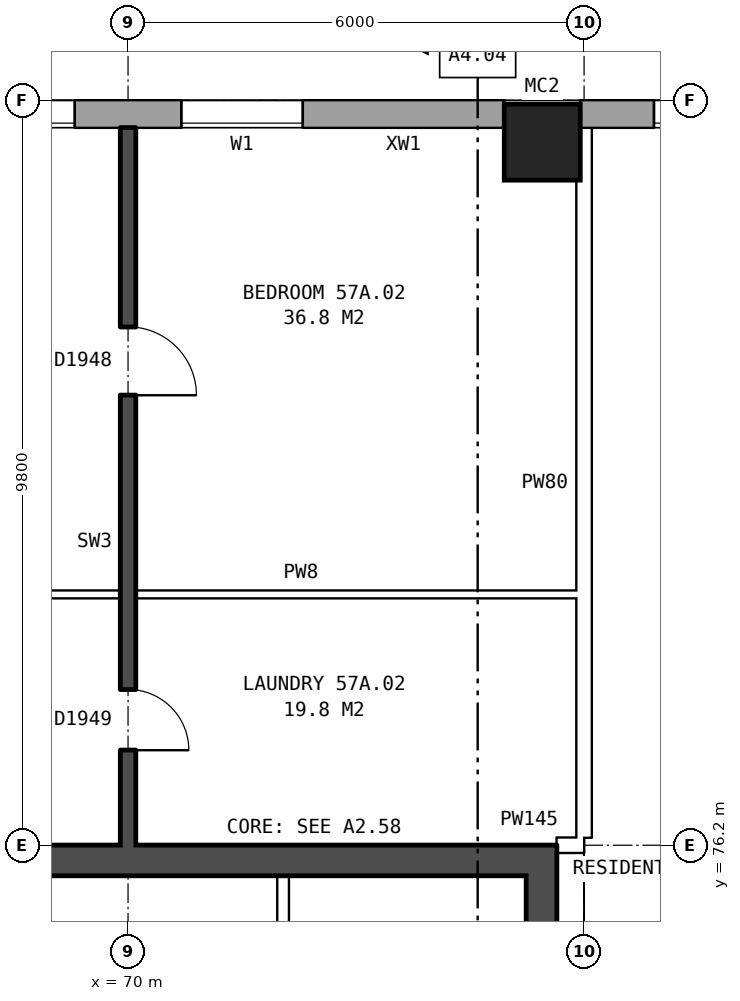
"""IFC4 building model, lengths in metres.
Left out: names, types, materials, properties, quantities, classifications, styles, units other than length and angle.
Written with IfcOpenShell. Run it as: python <this file> out.ifc"""

import sys

from ifc_helpers import new_model, si_unit, direction, frame, frame_2d, origin, origin_2d, place, context, subcontext, project, spatial, rectangle, hollow_rectangle, extrude, element, fill, save


model = new_model("IFC4")
c1 = context("Model", 3, precision=1e-05, world=origin(), true_north=direction((0.0, 1.0)))
c2 = subcontext(c1, "Body", "Model", "MODEL_VIEW")
j1 = project(units=[si_unit("LENGTHUNIT", "METRE"), si_unit("PLANEANGLEUNIT", "RADIAN")], contexts=[c1])
p1 = place(None, origin())
s1 = spatial("IfcSite", under=j1, at=p1, CompositionType="ELEMENT")
p2 = place(p1, origin())
s2 = spatial("IfcBuilding", under=s1, at=p2, CompositionType="ELEMENT")
p3 = place(p2, frame((0.0, 0.0, 202.8)))
s3 = spatial("IfcBuildingStorey", under=s2, at=p3, CompositionType="ELEMENT", Elevation=202.8)
p4 = place(p3, frame((75.45, 85.45, 0.0), z_axis=(0.0, 0.0, 1.0), x_axis=(1.0, 0.0, 0.0)))
e1 = element("IfcColumn", 1, at=p4, inside=s3, PredefinedType="COLUMN", context=c2, shape_type="SweptSolid", body=[
    extrude(hollow_rectangle(XDim=1.0, YDim=1.0, WallThickness=0.055, at=origin_2d()), origin(), (0.0, 0.0, 1.0), 3.1),
])
p5 = place(p3, frame((131.05, 85.82, 0.0), z_axis=(0.0, 0.0, 1.0), x_axis=(-1.0, 0.0, 0.0)))
e2 = element("IfcWall", 2, at=p5, inside=s3, PredefinedType="STANDARD", context=c2, shape_type="SweptSolid", body=[
    extrude(rectangle(XDim=55.1, YDim=0.36, at=frame_2d((27.55, 0.0))), origin(), (0.0, 0.0, 1.0), 2.85),
])
p6 = place(p5, frame((0.969, 0.0, 0.8)))
e3 = element("IfcOpeningElement", 3, at=p6, cuts=e2, PredefinedType="OPENING", context=c2, shape_type="SweptSolid", body=[
    extrude(rectangle(XDim=1.6, YDim=1.8, at=frame_2d((0.8, 0.9))), frame((0.0, 0.19, 0.0), z_axis=(0.0, -1.0, 0.0), x_axis=(1.0, 0.0, 0.0)), (0.0, 0.0, 1.0), 0.38),
])
p7 = place(p5, frame((4.406, 0.0, 0.8)))
e4 = element("IfcOpeningElement", 4, at=p7, cuts=e2, PredefinedType="OPENING", context=c2, shape_type="SweptSolid", body=[
    extrude(rectangle(XDim=1.6, YDim=1.8, at=frame_2d((0.8, 0.9))), frame((0.0, 0.19, 0.0), z_axis=(0.0, -1.0, 0.0), x_axis=(1.0, 0.0, 0.0)), (0.0, 0.0, 1.0), 0.38),
])
p8 = place(p5, frame((7.844, 0.0, 0.8)))
e5 = element("IfcOpeningElement", 5, at=p8, cuts=e2, PredefinedType="OPENING", context=c2, shape_type="SweptSolid", body=[
    extrude(rectangle(XDim=1.6, YDim=1.8, at=frame_2d((0.8, 0.9))), frame((0.0, 0.19, 0.0), z_axis=(0.0, -1.0, 0.0), x_axis=(1.0, 0.0, 0.0)), (0.0, 0.0, 1.0), 0.38),
])
p9 = place(p5, frame((11.281, 0.0, 0.8)))
e6 = element("IfcOpeningElement", 6, at=p9, cuts=e2, PredefinedType="OPENING", context=c2, shape_type="SweptSolid", body=[
    extrude(rectangle(XDim=1.6, YDim=1.8, at=frame_2d((0.8, 0.9))), frame((0.0, 0.19, 0.0), z_axis=(0.0, -1.0, 0.0), x_axis=(1.0, 0.0, 0.0)), (0.0, 0.0, 1.0), 0.38),
])
p10 = place(p5, frame((14.719, 0.0, 0.8)))
e7 = element("IfcOpeningElement", 7, at=p10, cuts=e2, PredefinedType="OPENING", context=c2, shape_type="SweptSolid", body=[
    extrude(rectangle(XDim=1.6, YDim=1.8, at=frame_2d((0.8, 0.9))), frame((0.0, 0.19, 0.0), z_axis=(0.0, -1.0, 0.0), x_axis=(1.0, 0.0, 0.0)), (0.0, 0.0, 1.0), 0.38),
])
p11 = place(p5, frame((18.156, 0.0, 0.8)))
e8 = element("IfcOpeningElement", 8, at=p11, cuts=e2, PredefinedType="OPENING", context=c2, shape_type="SweptSolid", body=[
    extrude(rectangle(XDim=1.6, YDim=1.8, at=frame_2d((0.8, 0.9))), frame((0.0, 0.19, 0.0), z_axis=(0.0, -1.0, 0.0), x_axis=(1.0, 0.0, 0.0)), (0.0, 0.0, 1.0), 0.38),
])
p12 = place(p5, frame((21.594, 0.0, 0.8)))
e9 = element("IfcOpeningElement", 9, at=p12, cuts=e2, PredefinedType="OPENING", context=c2, shape_type="SweptSolid", body=[
    extrude(rectangle(XDim=1.6, YDim=1.8, at=frame_2d((0.8, 0.9))), frame((0.0, 0.19, 0.0), z_axis=(0.0, -1.0, 0.0), x_axis=(1.0, 0.0, 0.0)), (0.0, 0.0, 1.0), 0.38),
])
p13 = place(p5, frame((25.031, 0.0, 0.8)))
e10 = element("IfcOpeningElement", 10, at=p13, cuts=e2, PredefinedType="OPENING", context=c2, shape_type="SweptSolid", body=[
    extrude(rectangle(XDim=1.6, YDim=1.8, at=frame_2d((0.8, 0.9))), frame((0.0, 0.19, 0.0), z_axis=(0.0, -1.0, 0.0), x_axis=(1.0, 0.0, 0.0)), (0.0, 0.0, 1.0), 0.38),
])
p14 = place(p5, frame((28.469, 0.0, 0.8)))
e11 = element("IfcOpeningElement", 11, at=p14, cuts=e2, PredefinedType="OPENING", context=c2, shape_type="SweptSolid", body=[
    extrude(rectangle(XDim=1.6, YDim=1.8, at=frame_2d((0.8, 0.9))), frame((0.0, 0.19, 0.0), z_axis=(0.0, -1.0, 0.0), x_axis=(1.0, 0.0, 0.0)), (0.0, 0.0, 1.0), 0.38),
])
p15 = place(p5, frame((31.906, 0.0, 0.8)))
e12 = element("IfcOpeningElement", 12, at=p15, cuts=e2, PredefinedType="OPENING", context=c2, shape_type="SweptSolid", body=[
    extrude(rectangle(XDim=1.6, YDim=1.8, at=frame_2d((0.8, 0.9))), frame((0.0, 0.19, 0.0), z_axis=(0.0, -1.0, 0.0), x_axis=(1.0, 0.0, 0.0)), (0.0, 0.0, 1.0), 0.38),
])
p16 = place(p5, frame((35.344, 0.0, 0.8)))
e13 = element("IfcOpeningElement", 13, at=p16, cuts=e2, PredefinedType="OPENING", context=c2, shape_type="SweptSolid", body=[
    extrude(rectangle(XDim=1.6, YDim=1.8, at=frame_2d((0.8, 0.9))), frame((0.0, 0.19, 0.0), z_axis=(0.0, -1.0, 0.0), x_axis=(1.0, 0.0, 0.0)), (0.0, 0.0, 1.0), 0.38),
])
p17 = place(p5, frame((38.781, 0.0, 0.8)))
e14 = element("IfcOpeningElement", 14, at=p17, cuts=e2, PredefinedType="OPENING", context=c2, shape_type="SweptSolid", body=[
    extrude(rectangle(XDim=1.6, YDim=1.8, at=frame_2d((0.8, 0.9))), frame((0.0, 0.19, 0.0), z_axis=(0.0, -1.0, 0.0), x_axis=(1.0, 0.0, 0.0)), (0.0, 0.0, 1.0), 0.38),
])
p18 = place(p5, frame((42.219, 0.0, 0.8)))
e15 = element("IfcOpeningElement", 15, at=p18, cuts=e2, PredefinedType="OPENING", context=c2, shape_type="SweptSolid", body=[
    extrude(rectangle(XDim=1.6, YDim=1.8, at=frame_2d((0.8, 0.9))), frame((0.0, 0.19, 0.0), z_axis=(0.0, -1.0, 0.0), x_axis=(1.0, 0.0, 0.0)), (0.0, 0.0, 1.0), 0.38),
])
p19 = place(p5, frame((45.656, 0.0, 0.8)))
e16 = element("IfcOpeningElement", 16, at=p19, cuts=e2, PredefinedType="OPENING", context=c2, shape_type="SweptSolid", body=[
    extrude(rectangle(XDim=1.6, YDim=1.8, at=frame_2d((0.8, 0.9))), frame((0.0, 0.19, 0.0), z_axis=(0.0, -1.0, 0.0), x_axis=(1.0, 0.0, 0.0)), (0.0, 0.0, 1.0), 0.38),
])
p20 = place(p5, frame((49.094, 0.0, 0.8)))
e17 = element("IfcOpeningElement", 17, at=p20, cuts=e2, PredefinedType="OPENING", context=c2, shape_type="SweptSolid", body=[
    extrude(rectangle(XDim=1.6, YDim=1.8, at=frame_2d((0.8, 0.9))), frame((0.0, 0.19, 0.0), z_axis=(0.0, -1.0, 0.0), x_axis=(1.0, 0.0, 0.0)), (0.0, 0.0, 1.0), 0.38),
])
p21 = place(p5, frame((52.531, 0.0, 0.8)))
e18 = element("IfcOpeningElement", 18, at=p21, cuts=e2, PredefinedType="OPENING", context=c2, shape_type="SweptSolid", body=[
    extrude(rectangle(XDim=1.6, YDim=1.8, at=frame_2d((0.8, 0.9))), frame((0.0, 0.19, 0.0), z_axis=(0.0, -1.0, 0.0), x_axis=(1.0, 0.0, 0.0)), (0.0, 0.0, 1.0), 0.38),
])
p22 = place(p3, frame((74.95, 85.82, 0.0), z_axis=(0.0, 0.0, 1.0), x_axis=(-1.0, 0.0, 0.0)))
e19 = element("IfcWall", 19, at=p22, inside=s3, PredefinedType="STANDARD", context=c2, shape_type="SweptSolid", body=[
    extrude(rectangle(XDim=39.875, YDim=0.36, at=frame_2d((19.938, 0.0))), origin(), (0.0, 0.0, 1.0), 2.85),
])
p23 = place(p22, frame((2.65, 0.0, 0.8)))
e20 = element("IfcOpeningElement", 20, at=p23, cuts=e19, PredefinedType="OPENING", context=c2, shape_type="SweptSolid", body=[
    extrude(rectangle(XDim=1.6, YDim=1.8, at=frame_2d((0.8, 0.9))), frame((0.0, 0.19, 0.0), z_axis=(0.0, -1.0, 0.0), x_axis=(1.0, 0.0, 0.0)), (0.0, 0.0, 1.0), 0.38),
])
p24 = place(p22, frame((5.65, 0.0, 0.8)))
e21 = element("IfcOpeningElement", 21, at=p24, cuts=e19, PredefinedType="OPENING", context=c2, shape_type="SweptSolid", body=[
    extrude(rectangle(XDim=1.6, YDim=1.8, at=frame_2d((0.8, 0.9))), frame((0.0, 0.19, 0.0), z_axis=(0.0, -1.0, 0.0), x_axis=(1.0, 0.0, 0.0)), (0.0, 0.0, 1.0), 0.38),
])
p25 = place(p22, frame((8.65, 0.0, 0.8)))
e22 = element("IfcOpeningElement", 22, at=p25, cuts=e19, PredefinedType="OPENING", context=c2, shape_type="SweptSolid", body=[
    extrude(rectangle(XDim=1.6, YDim=1.8, at=frame_2d((0.8, 0.9))), frame((0.0, 0.19, 0.0), z_axis=(0.0, -1.0, 0.0), x_axis=(1.0, 0.0, 0.0)), (0.0, 0.0, 1.0), 0.38),
])
p26 = place(p22, frame((11.65, 0.0, 0.8)))
e23 = element("IfcOpeningElement", 23, at=p26, cuts=e19, PredefinedType="OPENING", context=c2, shape_type="SweptSolid", body=[
    extrude(rectangle(XDim=1.6, YDim=1.8, at=frame_2d((0.8, 0.9))), frame((0.0, 0.19, 0.0), z_axis=(0.0, -1.0, 0.0), x_axis=(1.0, 0.0, 0.0)), (0.0, 0.0, 1.0), 0.38),
])
p27 = place(p22, frame((14.65, 0.0, 0.8)))
e24 = element("IfcOpeningElement", 24, at=p27, cuts=e19, PredefinedType="OPENING", context=c2, shape_type="SweptSolid", body=[
    extrude(rectangle(XDim=1.6, YDim=1.8, at=frame_2d((0.8, 0.9))), frame((0.0, 0.19, 0.0), z_axis=(0.0, -1.0, 0.0), x_axis=(1.0, 0.0, 0.0)), (0.0, 0.0, 1.0), 0.38),
])
p28 = place(p22, frame((17.65, 0.0, 0.8)))
e25 = element("IfcOpeningElement", 25, at=p28, cuts=e19, PredefinedType="OPENING", context=c2, shape_type="SweptSolid", body=[
    extrude(rectangle(XDim=1.6, YDim=1.8, at=frame_2d((0.8, 0.9))), frame((0.0, 0.19, 0.0), z_axis=(0.0, -1.0, 0.0), x_axis=(1.0, 0.0, 0.0)), (0.0, 0.0, 1.0), 0.38),
])
p29 = place(p22, frame((20.65, 0.0, 0.8)))
e26 = element("IfcOpeningElement", 26, at=p29, cuts=e19, PredefinedType="OPENING", context=c2, shape_type="SweptSolid", body=[
    extrude(rectangle(XDim=1.6, YDim=1.8, at=frame_2d((0.8, 0.9))), frame((0.0, 0.19, 0.0), z_axis=(0.0, -1.0, 0.0), x_axis=(1.0, 0.0, 0.0)), (0.0, 0.0, 1.0), 0.38),
])
p30 = place(p22, frame((23.65, 0.0, 0.8)))
e27 = element("IfcOpeningElement", 27, at=p30, cuts=e19, PredefinedType="OPENING", context=c2, shape_type="SweptSolid", body=[
    extrude(rectangle(XDim=1.6, YDim=1.8, at=frame_2d((0.8, 0.9))), frame((0.0, 0.19, 0.0), z_axis=(0.0, -1.0, 0.0), x_axis=(1.0, 0.0, 0.0)), (0.0, 0.0, 1.0), 0.38),
])
p31 = place(p22, frame((26.65, 0.0, 0.8)))
e28 = element("IfcOpeningElement", 28, at=p31, cuts=e19, PredefinedType="OPENING", context=c2, shape_type="SweptSolid", body=[
    extrude(rectangle(XDim=1.6, YDim=1.8, at=frame_2d((0.8, 0.9))), frame((0.0, 0.19, 0.0), z_axis=(0.0, -1.0, 0.0), x_axis=(1.0, 0.0, 0.0)), (0.0, 0.0, 1.0), 0.38),
])
p32 = place(p22, frame((29.65, 0.0, 0.8)))
e29 = element("IfcOpeningElement", 29, at=p32, cuts=e19, PredefinedType="OPENING", context=c2, shape_type="SweptSolid", body=[
    extrude(rectangle(XDim=1.6, YDim=1.8, at=frame_2d((0.8, 0.9))), frame((0.0, 0.19, 0.0), z_axis=(0.0, -1.0, 0.0), x_axis=(1.0, 0.0, 0.0)), (0.0, 0.0, 1.0), 0.38),
])
p33 = place(p22, frame((32.65, 0.0, 0.8)))
e30 = element("IfcOpeningElement", 30, at=p33, cuts=e19, PredefinedType="OPENING", context=c2, shape_type="SweptSolid", body=[
    extrude(rectangle(XDim=1.6, YDim=1.8, at=frame_2d((0.8, 0.9))), frame((0.0, 0.19, 0.0), z_axis=(0.0, -1.0, 0.0), x_axis=(1.0, 0.0, 0.0)), (0.0, 0.0, 1.0), 0.38),
])
p34 = place(p22, frame((35.65, 0.0, 0.8)))
e31 = element("IfcOpeningElement", 31, at=p34, cuts=e19, PredefinedType="OPENING", context=c2, shape_type="SweptSolid", body=[
    extrude(rectangle(XDim=1.6, YDim=1.8, at=frame_2d((0.8, 0.9))), frame((0.0, 0.19, 0.0), z_axis=(0.0, -1.0, 0.0), x_axis=(1.0, 0.0, 0.0)), (0.0, 0.0, 1.0), 0.38),
])
p35 = place(p3, frame((75.44, 63.8, 0.0), z_axis=(0.0, 0.0, 1.0), x_axis=(0.0, 1.0, 0.0)))
e32 = element("IfcWall", 32, at=p35, inside=s3, PredefinedType="SHEAR", context=c2, shape_type="SweptSolid", body=[
    extrude(rectangle(XDim=12.4, YDim=0.4, at=frame_2d((6.2, 0.0))), origin(), (0.0, 0.0, 1.0), 2.85),
])
p36 = place(p35, frame((9.8, 0.0, 0.0)))
e33 = element("IfcOpeningElement", 33, at=p36, cuts=e32, PredefinedType="OPENING", context=c2, shape_type="SweptSolid", body=[
    extrude(rectangle(XDim=1.1, YDim=2.1, at=frame_2d((0.55, 1.05))), frame((0.0, 0.21, 0.0), z_axis=(0.0, -1.0, 0.0), x_axis=(1.0, 0.0, 0.0)), (0.0, 0.0, 1.0), 0.42),
])
p37 = place(p3, frame((67.04, 76.0, 0.0), z_axis=(0.0, 0.0, 1.0), x_axis=(1.0, 0.0, 0.0)))
e34 = element("IfcWall", 34, at=p37, inside=s3, PredefinedType="SHEAR", context=c2, shape_type="SweptSolid", body=[
    extrude(rectangle(XDim=8.2, YDim=0.4, at=frame_2d((4.1, 0.0))), origin(), (0.0, 0.0, 1.0), 2.85),
])
p38 = place(p3, frame((72.04, 73.45, 0.0), z_axis=(0.0, 0.0, 1.0), x_axis=(0.0, 1.0, 0.0)))
e35 = element("IfcWall", 35, at=p38, inside=s3, PredefinedType="PARTITIONING", context=c2, shape_type="SweptSolid", body=[
    extrude(rectangle(XDim=2.35, YDim=0.15, at=frame_2d((1.175, 0.0))), origin(), (0.0, 0.0, 1.0), 2.85),
])
p39 = place(p38, frame((0.75, 0.0, 0.0)))
e36 = element("IfcOpeningElement", 36, at=p39, cuts=e35, PredefinedType="OPENING", context=c2, shape_type="SweptSolid", body=[
    extrude(rectangle(XDim=0.85, YDim=2.1, at=frame_2d((0.425, 1.05))), frame((0.0, 0.085, 0.0), z_axis=(0.0, -1.0, 0.0), x_axis=(1.0, 0.0, 0.0)), (0.0, 0.0, 1.0), 0.17),
])
p40 = place(p3, frame((75.64, 76.2, 0.0), z_axis=(0.0, 0.0, 1.0), x_axis=(1.0, 0.0, 0.0)))
e37 = element("IfcWall", 37, at=p40, inside=s3, PredefinedType="PARTITIONING", context=c2, shape_type="SweptSolid", body=[
    extrude(rectangle(XDim=0.36, YDim=0.2, at=frame_2d((0.18, 0.0))), origin(), (0.0, 0.0, 1.0), 2.85),
])
p41 = place(p3, frame((64.1, 79.5, 0.0), z_axis=(0.0, 0.0, 1.0), x_axis=(1.0, 0.0, 0.0)))
e38 = element("IfcWall", 38, at=p41, inside=s3, PredefinedType="PARTITIONING", context=c2, shape_type="SweptSolid", body=[
    extrude(rectangle(XDim=11.8, YDim=0.1, at=frame_2d((5.9, 0.0))), origin(), (0.0, 0.0, 1.0), 2.85),
])
p42 = place(p41, frame((3.65, 0.0, 0.0)))
e39 = element("IfcOpeningElement", 39, at=p42, cuts=e38, PredefinedType="OPENING", context=c2, shape_type="SweptSolid", body=[
    extrude(rectangle(XDim=0.9, YDim=2.1, at=frame_2d((0.45, 1.05))), frame((0.0, 0.06, 0.0), z_axis=(0.0, -1.0, 0.0), x_axis=(1.0, 0.0, 0.0)), (0.0, 0.0, 1.0), 0.12),
])
p43 = place(p41, frame((0.7, 0.0, 0.0)))
e40 = element("IfcOpeningElement", 40, at=p43, cuts=e38, PredefinedType="OPENING", context=c2, shape_type="SweptSolid", body=[
    extrude(rectangle(XDim=0.9, YDim=2.1, at=frame_2d((0.45, 1.05))), frame((0.0, 0.06, 0.0), z_axis=(0.0, -1.0, 0.0), x_axis=(1.0, 0.0, 0.0)), (0.0, 0.0, 1.0), 0.12),
])
p44 = place(p3, frame((70.0, 76.2, 0.0), z_axis=(0.0, 0.0, 1.0), x_axis=(0.0, 1.0, 0.0)))
e41 = element("IfcWall", 41, at=p44, inside=s3, PredefinedType="SOLIDWALL", context=c2, shape_type="SweptSolid", body=[
    extrude(rectangle(XDim=9.44, YDim=0.2, at=frame_2d((4.72, 0.0))), origin(), (0.0, 0.0, 1.0), 2.85),
])
p45 = place(p44, frame((5.92, 0.0, 0.0)))
e42 = element("IfcOpeningElement", 42, at=p45, cuts=e41, PredefinedType="OPENING", context=c2, shape_type="SweptSolid", body=[
    extrude(rectangle(XDim=0.9, YDim=2.1, at=frame_2d((0.45, 1.05))), frame((0.0, 0.11, 0.0), z_axis=(0.0, -1.0, 0.0), x_axis=(1.0, 0.0, 0.0)), (0.0, 0.0, 1.0), 0.22),
])
p46 = place(p44, frame((1.25, 0.0, 0.0)))
e43 = element("IfcOpeningElement", 43, at=p46, cuts=e41, PredefinedType="OPENING", context=c2, shape_type="SweptSolid", body=[
    extrude(rectangle(XDim=0.8, YDim=2.1, at=frame_2d((0.4, 1.05))), frame((0.0, 0.11, 0.0), z_axis=(0.0, -1.0, 0.0), x_axis=(1.0, 0.0, 0.0)), (0.0, 0.0, 1.0), 0.22),
])
p47 = place(p3, frame((76.0, 76.3, 0.0), z_axis=(0.0, 0.0, 1.0), x_axis=(0.0, 1.0, 0.0)))
e44 = element("IfcWall", 44, at=p47, inside=s3, PredefinedType="PARTITIONING", context=c2, shape_type="SweptSolid", body=[
    extrude(rectangle(XDim=9.34, YDim=0.2, at=frame_2d((4.67, 0.0))), origin(), (0.0, 0.0, 1.0), 2.85),
])
p48 = place(p21, origin())
e45 = element("IfcWindow", 45, at=p48, inside=s3, PartitioningType="SINGLE_PANEL", PredefinedType="WINDOW", context=c2, shape_type="SweptSolid", body=[
    extrude(rectangle(XDim=1.6, YDim=1.8, at=frame_2d((0.8, 0.9))), frame((0.0, 0.15, 0.0), z_axis=(0.0, -1.0, 0.0), x_axis=(1.0, 0.0, 0.0)), (0.0, 0.0, 1.0), 0.06),
])
fill(e18, e45)
p49 = place(p23, origin())
e46 = element("IfcWindow", 46, at=p49, inside=s3, PartitioningType="SINGLE_PANEL", PredefinedType="WINDOW", context=c2, shape_type="SweptSolid", body=[
    extrude(rectangle(XDim=1.6, YDim=1.8, at=frame_2d((0.8, 0.9))), frame((0.0, 0.15, 0.0), z_axis=(0.0, -1.0, 0.0), x_axis=(1.0, 0.0, 0.0)), (0.0, 0.0, 1.0), 0.06),
])
fill(e20, e46)
p50 = place(p24, origin())
e47 = element("IfcWindow", 47, at=p50, inside=s3, PartitioningType="SINGLE_PANEL", PredefinedType="WINDOW", context=c2, shape_type="SweptSolid", body=[
    extrude(rectangle(XDim=1.6, YDim=1.8, at=frame_2d((0.8, 0.9))), frame((0.0, 0.15, 0.0), z_axis=(0.0, -1.0, 0.0), x_axis=(1.0, 0.0, 0.0)), (0.0, 0.0, 1.0), 0.06),
])
fill(e21, e47)
p51 = place(p45, frame((0.9, 0.0, 0.0), z_axis=(0.0, 0.0, 1.0), x_axis=(-1.0, 0.0, 0.0)))
e48 = element("IfcDoor", 48, at=p51, inside=s3, OperationType="SINGLE_SWING_RIGHT", PredefinedType="DOOR", context=c2, shape_type="SweptSolid", body=[
    extrude(rectangle(XDim=0.9, YDim=2.1, at=frame_2d((0.45, 1.05))), frame((0.0, 0.025, 0.0), z_axis=(0.0, -1.0, 0.0), x_axis=(1.0, 0.0, 0.0)), (0.0, 0.0, 1.0), 0.05),
])
fill(e42, e48)
p52 = place(p46, frame((0.8, 0.0, 0.0), z_axis=(0.0, 0.0, 1.0), x_axis=(-1.0, 0.0, 0.0)))
e49 = element("IfcDoor", 49, at=p52, inside=s3, OperationType="SINGLE_SWING_RIGHT", PredefinedType="DOOR", context=c2, shape_type="SweptSolid", body=[
    extrude(rectangle(XDim=0.8, YDim=2.1, at=frame_2d((0.4, 1.05))), frame((0.0, 0.025, 0.0), z_axis=(0.0, -1.0, 0.0), x_axis=(1.0, 0.0, 0.0)), (0.0, 0.0, 1.0), 0.05),
])
fill(e43, e49)
save(model, sys.argv[1])
